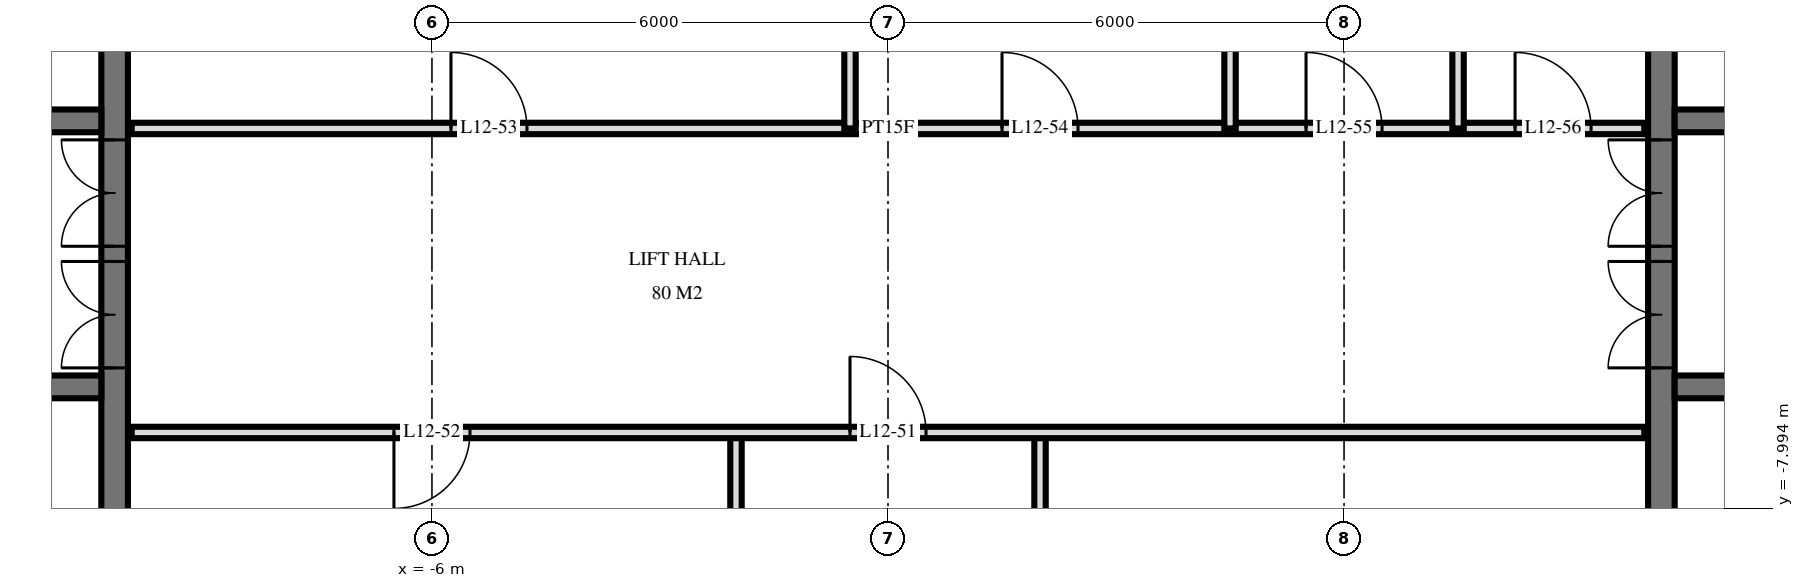
"""IFC4 building model, lengths in metres.
Left out: names, types, materials, properties, quantities, classifications, styles, units other than length and angle.
Written with IfcOpenShell. Run it as: python <this file> out.ifc"""

import sys

from ifc_helpers import new_model, si_unit, direction, frame, frame_2d, origin, place, context, subcontext, project, spatial, rectangle, extrude, element, fill, save


model = new_model("IFC4")
c1 = context("Model", 3, precision=1e-05, world=origin(), true_north=direction((0.0, 1.0)))
c2 = subcontext(c1, "Body", "Model", "MODEL_VIEW")
j1 = project(units=[si_unit("LENGTHUNIT", "METRE"), si_unit("PLANEANGLEUNIT", "RADIAN")], contexts=[c1])
p1 = place(None, origin())
s1 = spatial("IfcSite", under=j1, at=p1, CompositionType="ELEMENT")
p2 = place(p1, origin())
s2 = spatial("IfcBuilding", under=s1, at=p2, CompositionType="ELEMENT")
p3 = place(p2, frame((0.0, 0.0, 52.8)))
s3 = spatial("IfcBuildingStorey", under=s2, at=p3, CompositionType="ELEMENT", Elevation=52.8)
p4 = place(p3, frame((-10.175, -14.55, 0.0), z_axis=(0.0, 0.0, 1.0), x_axis=(0.0, 1.0, 0.0)))
e1 = element("IfcWall", 1, at=p4, inside=s3, PredefinedType="SHEAR", context=c2, shape_type="SweptSolid", body=[
    extrude(rectangle(XDim=14.1, YDim=0.35, at=frame_2d((7.05, 0.0))), origin(), (0.0, 0.0, 1.0), 3.6),
])
p5 = place(p4, frame((8.4, 0.0, 0.0)))
e2 = element("IfcOpeningElement", 2, at=p5, cuts=e1, PredefinedType="OPENING", context=c2, shape_type="SweptSolid", body=[
    extrude(rectangle(XDim=1.4, YDim=2.4, at=frame_2d((0.7, 1.2))), frame((0.0, 0.185, 0.0), z_axis=(0.0, -1.0, 0.0), x_axis=(1.0, 0.0, 0.0)), (0.0, 0.0, 1.0), 0.37),
])
p6 = place(p4, frame((10.0, 0.0, 0.0)))
e3 = element("IfcOpeningElement", 3, at=p6, cuts=e1, PredefinedType="OPENING", context=c2, shape_type="SweptSolid", body=[
    extrude(rectangle(XDim=1.4, YDim=2.4, at=frame_2d((0.7, 1.2))), frame((0.0, 0.185, 0.0), z_axis=(0.0, -1.0, 0.0), x_axis=(1.0, 0.0, 0.0)), (0.0, 0.0, 1.0), 0.37),
])
p7 = place(p4, frame((4.0, 0.0, 0.0)))
e4 = element("IfcOpeningElement", 4, at=p7, cuts=e1, PredefinedType="OPENING", context=c2, shape_type="SweptSolid", body=[
    extrude(rectangle(XDim=1.2, YDim=2.1, at=frame_2d((0.6, 1.05))), frame((0.0, 0.185, 0.0), z_axis=(0.0, -1.0, 0.0), x_axis=(1.0, 0.0, 0.0)), (0.0, 0.0, 1.0), 0.37),
])
p8 = place(p3, frame((-29.05, -2.9, 0.0), z_axis=(0.0, 0.0, 1.0), x_axis=(1.0, 0.0, 0.0)))
e5 = element("IfcWall", 5, at=p8, inside=s3, PredefinedType="SHEAR", context=c2, shape_type="SweptSolid", body=[
    extrude(rectangle(XDim=18.7, YDim=0.3, at=frame_2d((9.35, 0.0))), origin(), (0.0, 0.0, 1.0), 3.6),
])
p9 = place(p8, frame((2.95, 0.0, 0.0)))
e6 = element("IfcOpeningElement", 6, at=p9, cuts=e5, PredefinedType="OPENING", context=c2, shape_type="SweptSolid", body=[
    extrude(rectangle(XDim=1.1, YDim=2.1, at=frame_2d((0.55, 1.05))), frame((0.0, 0.16, 0.0), z_axis=(0.0, -1.0, 0.0), x_axis=(1.0, 0.0, 0.0)), (0.0, 0.0, 1.0), 0.32),
])
p10 = place(p8, frame((0.55, 0.0, 0.0)))
e7 = element("IfcOpeningElement", 7, at=p10, cuts=e5, PredefinedType="OPENING", context=c2, shape_type="SweptSolid", body=[
    extrude(rectangle(XDim=1.1, YDim=2.1, at=frame_2d((0.55, 1.05))), frame((0.0, 0.16, 0.0), z_axis=(0.0, -1.0, 0.0), x_axis=(1.0, 0.0, 0.0)), (0.0, 0.0, 1.0), 0.32),
])
p11 = place(p8, frame((10.9, 0.0, 0.0)))
e8 = element("IfcOpeningElement", 8, at=p11, cuts=e5, PredefinedType="OPENING", context=c2, shape_type="SweptSolid", body=[
    extrude(rectangle(XDim=0.9, YDim=2.1, at=frame_2d((0.45, 1.05))), frame((0.0, 0.16, 0.0), z_axis=(0.0, -1.0, 0.0), x_axis=(1.0, 0.0, 0.0)), (0.0, 0.0, 1.0), 0.32),
])
p12 = place(p8, frame((16.85, 0.0, 0.0)))
e9 = element("IfcOpeningElement", 9, at=p12, cuts=e5, PredefinedType="OPENING", context=c2, shape_type="SweptSolid", body=[
    extrude(rectangle(XDim=1.0, YDim=2.1, at=frame_2d((0.5, 1.05))), frame((0.0, 0.16, 0.0), z_axis=(0.0, -1.0, 0.0), x_axis=(1.0, 0.0, 0.0)), (0.0, 0.0, 1.0), 0.32),
])
p13 = place(p8, frame((13.85, 0.0, 0.0)))
e10 = element("IfcOpeningElement", 10, at=p13, cuts=e5, PredefinedType="OPENING", context=c2, shape_type="SweptSolid", body=[
    extrude(rectangle(XDim=1.0, YDim=2.1, at=frame_2d((0.5, 1.05))), frame((0.0, 0.16, 0.0), z_axis=(0.0, -1.0, 0.0), x_axis=(1.0, 0.0, 0.0)), (0.0, 0.0, 1.0), 0.32),
])
p14 = place(p8, frame((5.6, 0.0, 0.0)))
e11 = element("IfcOpeningElement", 11, at=p14, cuts=e5, PredefinedType="OPENING", context=c2, shape_type="SweptSolid", body=[
    extrude(rectangle(XDim=1.0, YDim=2.1, at=frame_2d((0.5, 1.05))), frame((0.0, 0.16, 0.0), z_axis=(0.0, -1.0, 0.0), x_axis=(1.0, 0.0, 0.0)), (0.0, 0.0, 1.0), 0.32),
])
p15 = place(p3, frame((-29.05, -6.4, 0.0), z_axis=(0.0, 0.0, 1.0), x_axis=(1.0, 0.0, 0.0)))
e12 = element("IfcWall", 12, at=p15, inside=s3, PredefinedType="SHEAR", context=c2, shape_type="SweptSolid", body=[
    extrude(rectangle(XDim=18.7, YDim=0.3, at=frame_2d((9.35, 0.0))), origin(), (0.0, 0.0, 1.0), 3.6),
])
p16 = place(p15, frame((2.95, 0.0, 0.0)))
e13 = element("IfcOpeningElement", 13, at=p16, cuts=e12, PredefinedType="OPENING", context=c2, shape_type="SweptSolid", body=[
    extrude(rectangle(XDim=1.1, YDim=2.1, at=frame_2d((0.55, 1.05))), frame((0.0, 0.16, 0.0), z_axis=(0.0, -1.0, 0.0), x_axis=(1.0, 0.0, 0.0)), (0.0, 0.0, 1.0), 0.32),
])
p17 = place(p15, frame((0.55, 0.0, 0.0)))
e14 = element("IfcOpeningElement", 14, at=p17, cuts=e12, PredefinedType="OPENING", context=c2, shape_type="SweptSolid", body=[
    extrude(rectangle(XDim=1.1, YDim=2.1, at=frame_2d((0.55, 1.05))), frame((0.0, 0.16, 0.0), z_axis=(0.0, -1.0, 0.0), x_axis=(1.0, 0.0, 0.0)), (0.0, 0.0, 1.0), 0.32),
])
p18 = place(p15, frame((10.8, 0.0, 0.0)))
e15 = element("IfcOpeningElement", 15, at=p18, cuts=e12, PredefinedType="OPENING", context=c2, shape_type="SweptSolid", body=[
    extrude(rectangle(XDim=1.1, YDim=2.1, at=frame_2d((0.55, 1.05))), frame((0.0, 0.16, 0.0), z_axis=(0.0, -1.0, 0.0), x_axis=(1.0, 0.0, 0.0)), (0.0, 0.0, 1.0), 0.32),
])
p19 = place(p15, frame((5.6, 0.0, 0.0)))
e16 = element("IfcOpeningElement", 16, at=p19, cuts=e12, PredefinedType="OPENING", context=c2, shape_type="SweptSolid", body=[
    extrude(rectangle(XDim=1.0, YDim=2.1, at=frame_2d((0.5, 1.05))), frame((0.0, 0.16, 0.0), z_axis=(0.0, -1.0, 0.0), x_axis=(1.0, 0.0, 0.0)), (0.0, 0.0, 1.0), 0.32),
])
p20 = place(p3, frame((10.175, -14.55, 0.0), z_axis=(0.0, 0.0, 1.0), x_axis=(0.0, 1.0, 0.0)))
e17 = element("IfcWall", 17, at=p20, inside=s3, PredefinedType="SHEAR", context=c2, shape_type="SweptSolid", body=[
    extrude(rectangle(XDim=14.1, YDim=0.35, at=frame_2d((7.05, 0.0))), origin(), (0.0, 0.0, 1.0), 3.6),
])
p21 = place(p20, frame((8.4, 0.0, 0.0)))
e18 = element("IfcOpeningElement", 18, at=p21, cuts=e17, PredefinedType="OPENING", context=c2, shape_type="SweptSolid", body=[
    extrude(rectangle(XDim=1.4, YDim=2.4, at=frame_2d((0.7, 1.2))), frame((0.0, 0.185, 0.0), z_axis=(0.0, -1.0, 0.0), x_axis=(1.0, 0.0, 0.0)), (0.0, 0.0, 1.0), 0.37),
])
p22 = place(p20, frame((10.0, 0.0, 0.0)))
e19 = element("IfcOpeningElement", 19, at=p22, cuts=e17, PredefinedType="OPENING", context=c2, shape_type="SweptSolid", body=[
    extrude(rectangle(XDim=1.4, YDim=2.4, at=frame_2d((0.7, 1.2))), frame((0.0, 0.185, 0.0), z_axis=(0.0, -1.0, 0.0), x_axis=(1.0, 0.0, 0.0)), (0.0, 0.0, 1.0), 0.37),
])
p23 = place(p20, frame((4.0, 0.0, 0.0)))
e20 = element("IfcOpeningElement", 20, at=p23, cuts=e17, PredefinedType="OPENING", context=c2, shape_type="SweptSolid", body=[
    extrude(rectangle(XDim=1.2, YDim=2.1, at=frame_2d((0.6, 1.05))), frame((0.0, 0.185, 0.0), z_axis=(0.0, -1.0, 0.0), x_axis=(1.0, 0.0, 0.0)), (0.0, 0.0, 1.0), 0.37),
])
p24 = place(p3, frame((10.35, -2.9, 0.0), z_axis=(0.0, 0.0, 1.0), x_axis=(1.0, 0.0, 0.0)))
e21 = element("IfcWall", 21, at=p24, inside=s3, PredefinedType="SHEAR", context=c2, shape_type="SweptSolid", body=[
    extrude(rectangle(XDim=18.7, YDim=0.3, at=frame_2d((9.35, 0.0))), origin(), (0.0, 0.0, 1.0), 3.6),
])
p25 = place(p24, frame((14.65, 0.0, 0.0)))
e22 = element("IfcOpeningElement", 22, at=p25, cuts=e21, PredefinedType="OPENING", context=c2, shape_type="SweptSolid", body=[
    extrude(rectangle(XDim=1.1, YDim=2.1, at=frame_2d((0.55, 1.05))), frame((0.0, 0.16, 0.0), z_axis=(0.0, -1.0, 0.0), x_axis=(1.0, 0.0, 0.0)), (0.0, 0.0, 1.0), 0.32),
])
p26 = place(p24, frame((17.05, 0.0, 0.0)))
e23 = element("IfcOpeningElement", 23, at=p26, cuts=e21, PredefinedType="OPENING", context=c2, shape_type="SweptSolid", body=[
    extrude(rectangle(XDim=1.1, YDim=2.1, at=frame_2d((0.55, 1.05))), frame((0.0, 0.16, 0.0), z_axis=(0.0, -1.0, 0.0), x_axis=(1.0, 0.0, 0.0)), (0.0, 0.0, 1.0), 0.32),
])
p27 = place(p24, frame((6.9, 0.0, 0.0)))
e24 = element("IfcOpeningElement", 24, at=p27, cuts=e21, PredefinedType="OPENING", context=c2, shape_type="SweptSolid", body=[
    extrude(rectangle(XDim=0.9, YDim=2.1, at=frame_2d((0.45, 1.05))), frame((0.0, 0.16, 0.0), z_axis=(0.0, -1.0, 0.0), x_axis=(1.0, 0.0, 0.0)), (0.0, 0.0, 1.0), 0.32),
])
p28 = place(p24, frame((0.85, 0.0, 0.0)))
e25 = element("IfcOpeningElement", 25, at=p28, cuts=e21, PredefinedType="OPENING", context=c2, shape_type="SweptSolid", body=[
    extrude(rectangle(XDim=1.0, YDim=2.1, at=frame_2d((0.5, 1.05))), frame((0.0, 0.16, 0.0), z_axis=(0.0, -1.0, 0.0), x_axis=(1.0, 0.0, 0.0)), (0.0, 0.0, 1.0), 0.32),
])
p29 = place(p24, frame((3.85, 0.0, 0.0)))
e26 = element("IfcOpeningElement", 26, at=p29, cuts=e21, PredefinedType="OPENING", context=c2, shape_type="SweptSolid", body=[
    extrude(rectangle(XDim=1.0, YDim=2.1, at=frame_2d((0.5, 1.05))), frame((0.0, 0.16, 0.0), z_axis=(0.0, -1.0, 0.0), x_axis=(1.0, 0.0, 0.0)), (0.0, 0.0, 1.0), 0.32),
])
p30 = place(p24, frame((12.1, 0.0, 0.0)))
e27 = element("IfcOpeningElement", 27, at=p30, cuts=e21, PredefinedType="OPENING", context=c2, shape_type="SweptSolid", body=[
    extrude(rectangle(XDim=1.0, YDim=2.1, at=frame_2d((0.5, 1.05))), frame((0.0, 0.16, 0.0), z_axis=(0.0, -1.0, 0.0), x_axis=(1.0, 0.0, 0.0)), (0.0, 0.0, 1.0), 0.32),
])
p31 = place(p3, frame((10.35, -6.4, 0.0), z_axis=(0.0, 0.0, 1.0), x_axis=(1.0, 0.0, 0.0)))
e28 = element("IfcWall", 28, at=p31, inside=s3, PredefinedType="SHEAR", context=c2, shape_type="SweptSolid", body=[
    extrude(rectangle(XDim=18.7, YDim=0.3, at=frame_2d((9.35, 0.0))), origin(), (0.0, 0.0, 1.0), 3.6),
])
p32 = place(p31, frame((14.65, 0.0, 0.0)))
e29 = element("IfcOpeningElement", 29, at=p32, cuts=e28, PredefinedType="OPENING", context=c2, shape_type="SweptSolid", body=[
    extrude(rectangle(XDim=1.1, YDim=2.1, at=frame_2d((0.55, 1.05))), frame((0.0, 0.16, 0.0), z_axis=(0.0, -1.0, 0.0), x_axis=(1.0, 0.0, 0.0)), (0.0, 0.0, 1.0), 0.32),
])
p33 = place(p31, frame((17.05, 0.0, 0.0)))
e30 = element("IfcOpeningElement", 30, at=p33, cuts=e28, PredefinedType="OPENING", context=c2, shape_type="SweptSolid", body=[
    extrude(rectangle(XDim=1.1, YDim=2.1, at=frame_2d((0.55, 1.05))), frame((0.0, 0.16, 0.0), z_axis=(0.0, -1.0, 0.0), x_axis=(1.0, 0.0, 0.0)), (0.0, 0.0, 1.0), 0.32),
])
p34 = place(p31, frame((6.8, 0.0, 0.0)))
e31 = element("IfcOpeningElement", 31, at=p34, cuts=e28, PredefinedType="OPENING", context=c2, shape_type="SweptSolid", body=[
    extrude(rectangle(XDim=1.1, YDim=2.1, at=frame_2d((0.55, 1.05))), frame((0.0, 0.16, 0.0), z_axis=(0.0, -1.0, 0.0), x_axis=(1.0, 0.0, 0.0)), (0.0, 0.0, 1.0), 0.32),
])
p35 = place(p31, frame((12.1, 0.0, 0.0)))
e32 = element("IfcOpeningElement", 32, at=p35, cuts=e28, PredefinedType="OPENING", context=c2, shape_type="SweptSolid", body=[
    extrude(rectangle(XDim=1.0, YDim=2.1, at=frame_2d((0.5, 1.05))), frame((0.0, 0.16, 0.0), z_axis=(0.0, -1.0, 0.0), x_axis=(1.0, 0.0, 0.0)), (0.0, 0.0, 1.0), 0.32),
])
for number, where, z_axis, x_axis in (
    (33, (7.5, -3.0, 0.0), (0.0, 0.0, 1.0), (0.0, 1.0, 0.0)),
    (34, (4.5, -3.0, 0.0), (0.0, 0.0, 1.0), (0.0, 1.0, 0.0)),
):
    element("IfcWall", number, at=place(p3, frame(where, z_axis=z_axis, x_axis=x_axis)), inside=s3, PredefinedType="PLUMBINGWALL", context=c2, shape_type="SweptSolid", body=[
        extrude(rectangle(XDim=4.02, YDim=0.15, at=frame_2d((2.01, 0.0))), origin(), (0.0, 0.0, 1.0), 3.32),
    ])
p36 = place(p3, frame((2.0, -11.0, 0.0), z_axis=(0.0, 0.0, 1.0), x_axis=(0.0, 1.0, 0.0)))
e35 = element("IfcWall", 35, at=p36, inside=s3, PredefinedType="PARTITIONING", context=c2, shape_type="SweptSolid", body=[
    extrude(rectangle(XDim=4.0, YDim=0.15, at=frame_2d((2.0, 0.0))), origin(), (0.0, 0.0, 1.0), 3.32),
])
p37 = place(p3, frame((-0.5, -3.0, 0.0), z_axis=(0.0, 0.0, 1.0), x_axis=(0.0, 1.0, 0.0)))
e36 = element("IfcWall", 36, at=p37, inside=s3, PredefinedType="PARTITIONING", context=c2, shape_type="SweptSolid", body=[
    extrude(rectangle(XDim=4.02, YDim=0.15, at=frame_2d((2.01, 0.0))), origin(), (0.0, 0.0, 1.0), 3.32),
])
p38 = place(p3, frame((-2.0, -11.0, 0.0), z_axis=(0.0, 0.0, 1.0), x_axis=(0.0, 1.0, 0.0)))
e37 = element("IfcWall", 37, at=p38, inside=s3, PredefinedType="PARTITIONING", context=c2, shape_type="SweptSolid", body=[
    extrude(rectangle(XDim=4.0, YDim=0.15, at=frame_2d((2.0, 0.0))), origin(), (0.0, 0.0, 1.0), 3.32),
])
p39 = place(p3, frame((-9.95, -7.0, 0.0), z_axis=(0.0, 0.0, 1.0), x_axis=(1.0, 0.0, 0.0)))
e38 = element("IfcWall", 38, at=p39, inside=s3, PredefinedType="PARTITIONING", context=c2, shape_type="SweptSolid", body=[
    extrude(rectangle(XDim=19.9, YDim=0.15, at=frame_2d((9.95, 0.0))), origin(), (0.0, 0.0, 1.0), 3.32),
])
p40 = place(p39, frame((9.45, 0.0, 0.0)))
e39 = element("IfcOpeningElement", 39, at=p40, cuts=e38, PredefinedType="OPENING", context=c2, shape_type="SweptSolid", body=[
    extrude(rectangle(XDim=1.0, YDim=2.1, at=frame_2d((0.5, 1.05))), frame((0.0, 0.085, 0.0), z_axis=(0.0, -1.0, 0.0), x_axis=(1.0, 0.0, 0.0)), (0.0, 0.0, 1.0), 0.17),
])
p41 = place(p39, frame((3.45, 0.0, 0.0)))
e40 = element("IfcOpeningElement", 40, at=p41, cuts=e38, PredefinedType="OPENING", context=c2, shape_type="SweptSolid", body=[
    extrude(rectangle(XDim=1.0, YDim=2.1, at=frame_2d((0.5, 1.05))), frame((0.0, 0.085, 0.0), z_axis=(0.0, -1.0, 0.0), x_axis=(1.0, 0.0, 0.0)), (0.0, 0.0, 1.0), 0.17),
])
p42 = place(p3, frame((-9.95, -3.0, 0.0), z_axis=(0.0, 0.0, 1.0), x_axis=(1.0, 0.0, 0.0)))
e41 = element("IfcWall", 41, at=p42, inside=s3, PredefinedType="PARTITIONING", context=c2, shape_type="SweptSolid", body=[
    extrude(rectangle(XDim=19.9, YDim=0.15, at=frame_2d((9.95, 0.0))), origin(), (0.0, 0.0, 1.0), 3.32),
])
p43 = place(p42, frame((4.2, 0.0, 0.0)))
e42 = element("IfcOpeningElement", 42, at=p43, cuts=e41, PredefinedType="OPENING", context=c2, shape_type="SweptSolid", body=[
    extrude(rectangle(XDim=1.0, YDim=2.1, at=frame_2d((0.5, 1.05))), frame((0.0, 0.085, 0.0), z_axis=(0.0, -1.0, 0.0), x_axis=(1.0, 0.0, 0.0)), (0.0, 0.0, 1.0), 0.17),
])
p44 = place(p42, frame((11.45, 0.0, 0.0)))
e43 = element("IfcOpeningElement", 43, at=p44, cuts=e41, PredefinedType="OPENING", context=c2, shape_type="SweptSolid", body=[
    extrude(rectangle(XDim=1.0, YDim=2.1, at=frame_2d((0.5, 1.05))), frame((0.0, 0.085, 0.0), z_axis=(0.0, -1.0, 0.0), x_axis=(1.0, 0.0, 0.0)), (0.0, 0.0, 1.0), 0.17),
])
p45 = place(p42, frame((15.45, 0.0, 0.0)))
e44 = element("IfcOpeningElement", 44, at=p45, cuts=e41, PredefinedType="OPENING", context=c2, shape_type="SweptSolid", body=[
    extrude(rectangle(XDim=1.0, YDim=2.1, at=frame_2d((0.5, 1.05))), frame((0.0, 0.085, 0.0), z_axis=(0.0, -1.0, 0.0), x_axis=(1.0, 0.0, 0.0)), (0.0, 0.0, 1.0), 0.17),
])
p46 = place(p42, frame((18.2, 0.0, 0.0)))
e45 = element("IfcOpeningElement", 45, at=p46, cuts=e41, PredefinedType="OPENING", context=c2, shape_type="SweptSolid", body=[
    extrude(rectangle(XDim=1.0, YDim=2.1, at=frame_2d((0.5, 1.05))), frame((0.0, 0.085, 0.0), z_axis=(0.0, -1.0, 0.0), x_axis=(1.0, 0.0, 0.0)), (0.0, 0.0, 1.0), 0.17),
])
p47 = place(p5, origin())
e46 = element("IfcDoor", 46, at=p47, inside=s3, OperationType="DOUBLE_DOOR_SINGLE_SWING", PredefinedType="DOOR", context=c2, shape_type="SweptSolid", body=[
    extrude(rectangle(XDim=1.4, YDim=2.4, at=frame_2d((0.7, 1.2))), frame((0.0, 0.025, 0.0), z_axis=(0.0, -1.0, 0.0), x_axis=(1.0, 0.0, 0.0)), (0.0, 0.0, 1.0), 0.05),
])
fill(e2, e46)
p48 = place(p6, origin())
e47 = element("IfcDoor", 47, at=p48, inside=s3, OperationType="DOUBLE_DOOR_SINGLE_SWING", PredefinedType="DOOR", context=c2, shape_type="SweptSolid", body=[
    extrude(rectangle(XDim=1.4, YDim=2.4, at=frame_2d((0.7, 1.2))), frame((0.0, 0.025, 0.0), z_axis=(0.0, -1.0, 0.0), x_axis=(1.0, 0.0, 0.0)), (0.0, 0.0, 1.0), 0.05),
])
fill(e3, e47)
p49 = place(p21, origin())
e48 = element("IfcDoor", 48, at=p49, inside=s3, OperationType="DOUBLE_DOOR_SINGLE_SWING", PredefinedType="DOOR", context=c2, shape_type="SweptSolid", body=[
    extrude(rectangle(XDim=1.4, YDim=2.4, at=frame_2d((0.7, 1.2))), frame((0.0, 0.025, 0.0), z_axis=(0.0, -1.0, 0.0), x_axis=(1.0, 0.0, 0.0)), (0.0, 0.0, 1.0), 0.05),
])
fill(e18, e48)
p50 = place(p22, origin())
e49 = element("IfcDoor", 49, at=p50, inside=s3, OperationType="DOUBLE_DOOR_SINGLE_SWING", PredefinedType="DOOR", context=c2, shape_type="SweptSolid", body=[
    extrude(rectangle(XDim=1.4, YDim=2.4, at=frame_2d((0.7, 1.2))), frame((0.0, 0.025, 0.0), z_axis=(0.0, -1.0, 0.0), x_axis=(1.0, 0.0, 0.0)), (0.0, 0.0, 1.0), 0.05),
])
fill(e19, e49)
p51 = place(p40, origin())
e50 = element("IfcDoor", 50, at=p51, inside=s3, OperationType="SINGLE_SWING_RIGHT", PredefinedType="DOOR", context=c2, shape_type="SweptSolid", body=[
    extrude(rectangle(XDim=1.0, YDim=2.1, at=frame_2d((0.5, 1.05))), frame((0.0, 0.025, 0.0), z_axis=(0.0, -1.0, 0.0), x_axis=(1.0, 0.0, 0.0)), (0.0, 0.0, 1.0), 0.05),
])
fill(e39, e50)
p52 = place(p41, frame((0.5, 0.0, 0.0), z_axis=(0.0, 0.0, 1.0), x_axis=(-1.0, 0.0, 0.0)))
e51 = element("IfcDoor", 51, at=p52, inside=s3, OperationType="SINGLE_SWING_LEFT", PredefinedType="DOOR", context=c2, shape_type="SweptSolid", body=[
    extrude(rectangle(XDim=1.0, YDim=2.1, at=frame_2d((0.0, 1.05))), frame((0.0, -0.025, 0.0), z_axis=(0.0, 1.0, 0.0), x_axis=(-1.0, 0.0, 0.0)), (0.0, 0.0, 1.0), 0.05),
])
fill(e40, e51)
p53 = place(p43, origin())
e52 = element("IfcDoor", 52, at=p53, inside=s3, OperationType="SINGLE_SWING_RIGHT", PredefinedType="DOOR", context=c2, shape_type="SweptSolid", body=[
    extrude(rectangle(XDim=1.0, YDim=2.1, at=frame_2d((0.5, 1.05))), frame((0.0, 0.025, 0.0), z_axis=(0.0, -1.0, 0.0), x_axis=(1.0, 0.0, 0.0)), (0.0, 0.0, 1.0), 0.05),
])
fill(e42, e52)
p54 = place(p44, origin())
e53 = element("IfcDoor", 53, at=p54, inside=s3, OperationType="SINGLE_SWING_RIGHT", PredefinedType="DOOR", context=c2, shape_type="SweptSolid", body=[
    extrude(rectangle(XDim=1.0, YDim=2.1, at=frame_2d((0.5, 1.05))), frame((0.0, 0.025, 0.0), z_axis=(0.0, -1.0, 0.0), x_axis=(1.0, 0.0, 0.0)), (0.0, 0.0, 1.0), 0.05),
])
fill(e43, e53)
p55 = place(p45, origin())
e54 = element("IfcDoor", 54, at=p55, inside=s3, OperationType="SINGLE_SWING_RIGHT", PredefinedType="DOOR", context=c2, shape_type="SweptSolid", body=[
    extrude(rectangle(XDim=1.0, YDim=2.1, at=frame_2d((0.5, 1.05))), frame((0.0, 0.025, 0.0), z_axis=(0.0, -1.0, 0.0), x_axis=(1.0, 0.0, 0.0)), (0.0, 0.0, 1.0), 0.05),
])
fill(e44, e54)
p56 = place(p46, origin())
e55 = element("IfcDoor", 55, at=p56, inside=s3, OperationType="SINGLE_SWING_RIGHT", PredefinedType="DOOR", context=c2, shape_type="SweptSolid", body=[
    extrude(rectangle(XDim=1.0, YDim=2.1, at=frame_2d((0.5, 1.05))), frame((0.0, 0.025, 0.0), z_axis=(0.0, -1.0, 0.0), x_axis=(1.0, 0.0, 0.0)), (0.0, 0.0, 1.0), 0.05),
])
fill(e45, e55)
save(model, sys.argv[1])
